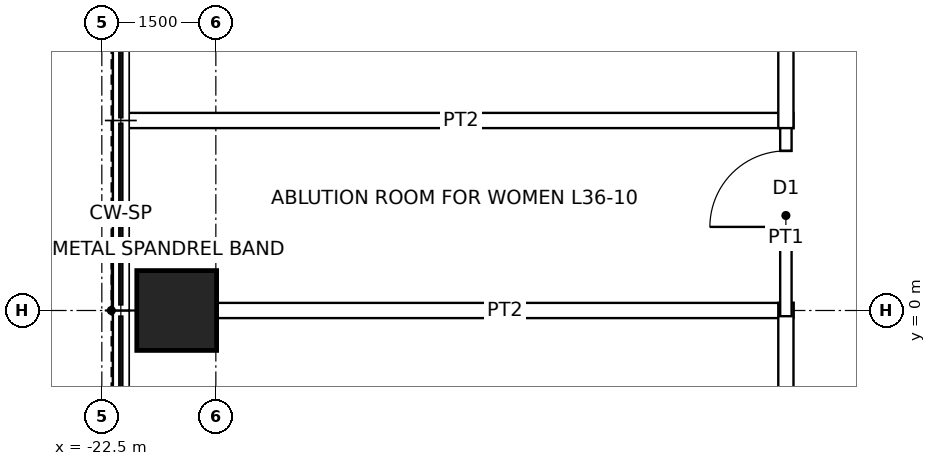
"""IFC4 building model, lengths in metres.
Left out: names, types, materials, properties, quantities, classifications, styles, units other than length and angle.
Written with IfcOpenShell. Run it as: python <this file> out.ifc"""

import sys

from ifc_helpers import new_model, si_unit, direction, frame, frame_2d, origin, origin_2d, place, context, subcontext, project, spatial, rectangle, hollow_rectangle, extrude, element, fill, save


model = new_model("IFC4")
c1 = context("Model", 3, precision=1e-05, world=origin(), true_north=direction((0.0, 1.0)))
c2 = subcontext(c1, "Body", "Model", "MODEL_VIEW")
j1 = project(units=[si_unit("LENGTHUNIT", "METRE"), si_unit("PLANEANGLEUNIT", "RADIAN")], contexts=[c1])
p1 = place(None, origin())
s1 = spatial("IfcSite", under=j1, at=p1, CompositionType="ELEMENT")
p2 = place(p1, origin())
s2 = spatial("IfcBuilding", under=s1, at=p2, CompositionType="ELEMENT")
p3 = place(p2, frame((0.0, 0.0, 177.9)))
s3 = spatial("IfcBuildingStorey", under=s2, at=p3, CompositionType="ELEMENT", Elevation=177.9)
p4 = place(p3, frame((-21.515, 0.0, 0.0), z_axis=(0.0, 0.0, 1.0), x_axis=(1.0, 0.0, 0.0)))
e1 = element("IfcColumn", 1, at=p4, inside=s3, PredefinedType="COLUMN", context=c2, shape_type="SweptSolid", body=[
    extrude(hollow_rectangle(XDim=1.05, YDim=1.05, WallThickness=0.07, at=origin_2d()), origin(), (0.0, 0.0, 1.0), 4.0),
])
p5 = place(p3, frame((-20.99, 0.0, 0.0), z_axis=(0.0, 0.0, 1.0), x_axis=(1.0, 0.0, 0.0)))
e2 = element("IfcWall", 2, at=p5, inside=s3, PredefinedType="PARTITIONING", context=c2, shape_type="SweptSolid", body=[
    extrude(rectangle(XDim=7.59, YDim=0.2, at=frame_2d((3.795, 0.0))), origin(), (0.0, 0.0, 1.0), 3.238),
])
p6 = place(p3, frame((-22.15, 2.5, 0.0), z_axis=(0.0, 0.0, 1.0), x_axis=(1.0, 0.0, 0.0)))
e3 = element("IfcWall", 3, at=p6, inside=s3, PredefinedType="PARTITIONING", context=c2, shape_type="SweptSolid", body=[
    extrude(rectangle(XDim=8.75, YDim=0.2, at=frame_2d((4.375, 0.0))), origin(), (0.0, 0.0, 1.0), 3.85),
])
p7 = place(p3, frame((-13.5, -7.6, 0.0), z_axis=(0.0, 0.0, 1.0), x_axis=(0.0, 1.0, 0.0)))
e4 = element("IfcWall", 4, at=p7, inside=s3, PredefinedType="PARTITIONING", context=c2, shape_type="SweptSolid", body=[
    extrude(rectangle(XDim=7.7, YDim=0.2, at=frame_2d((3.85, 0.0))), origin(), (0.0, 0.0, 1.0), 3.85),
])
p8 = place(p7, frame((3.35, 0.0, 0.0)))
e5 = element("IfcOpeningElement", 5, at=p8, cuts=e4, PredefinedType="OPENING", context=c2, shape_type="SweptSolid", body=[
    extrude(rectangle(XDim=1.0, YDim=2.1, at=frame_2d((0.5, 1.05))), frame((0.0, 0.11, 0.0), z_axis=(0.0, -1.0, 0.0), x_axis=(1.0, 0.0, 0.0)), (0.0, 0.0, 1.0), 0.22),
])
p9 = place(p3, frame((-13.5, -0.075, 0.0), z_axis=(0.0, 0.0, 1.0), x_axis=(0.0, 1.0, 0.0)))
e6 = element("IfcWall", 6, at=p9, inside=s3, PredefinedType="PARTITIONING", context=c2, shape_type="SweptSolid", body=[
    extrude(rectangle(XDim=2.65, YDim=0.15, at=frame_2d((1.325, 0.0))), origin(), (0.0, 0.0, 1.0), 3.85),
])
p10 = place(p9, frame((1.175, 0.0, 0.0)))
e7 = element("IfcOpeningElement", 7, at=p10, cuts=e6, PredefinedType="OPENING", context=c2, shape_type="SweptSolid", body=[
    extrude(rectangle(XDim=1.0, YDim=2.1, at=frame_2d((0.5, 1.05))), frame((0.0, 0.085, 0.0), z_axis=(0.0, -1.0, 0.0), x_axis=(1.0, 0.0, 0.0)), (0.0, 0.0, 1.0), 0.17),
])
p11 = place(p3, frame((-13.5, 2.4, 0.0), z_axis=(0.0, 0.0, 1.0), x_axis=(0.0, 1.0, 0.0)))
e8 = element("IfcWall", 8, at=p11, inside=s3, PredefinedType="PARTITIONING", context=c2, shape_type="SweptSolid", body=[
    extrude(rectangle(XDim=7.617, YDim=0.2, at=frame_2d((3.809, 0.0))), origin(), (0.0, 0.0, 1.0), 3.85),
])
p12 = place(p11, frame((3.309, 0.0, 0.0)))
e9 = element("IfcOpeningElement", 9, at=p12, cuts=e8, PredefinedType="OPENING", context=c2, shape_type="SweptSolid", body=[
    extrude(rectangle(XDim=1.0, YDim=2.1, at=frame_2d((0.5, 1.05))), frame((0.0, 0.11, 0.0), z_axis=(0.0, -1.0, 0.0), x_axis=(1.0, 0.0, 0.0)), (0.0, 0.0, 1.0), 0.22),
])
p13 = place(p10, origin())
e10 = element("IfcDoor", 10, at=p13, inside=s3, OperationType="SINGLE_SWING_LEFT", PredefinedType="DOOR", context=c2, shape_type="SweptSolid", body=[
    extrude(rectangle(XDim=1.0, YDim=2.1, at=frame_2d((0.5, 1.05))), frame((0.0, 0.025, 0.0), z_axis=(0.0, -1.0, 0.0), x_axis=(1.0, 0.0, 0.0)), (0.0, 0.0, 1.0), 0.05),
])
fill(e7, e10)
save(model, sys.argv[1])
